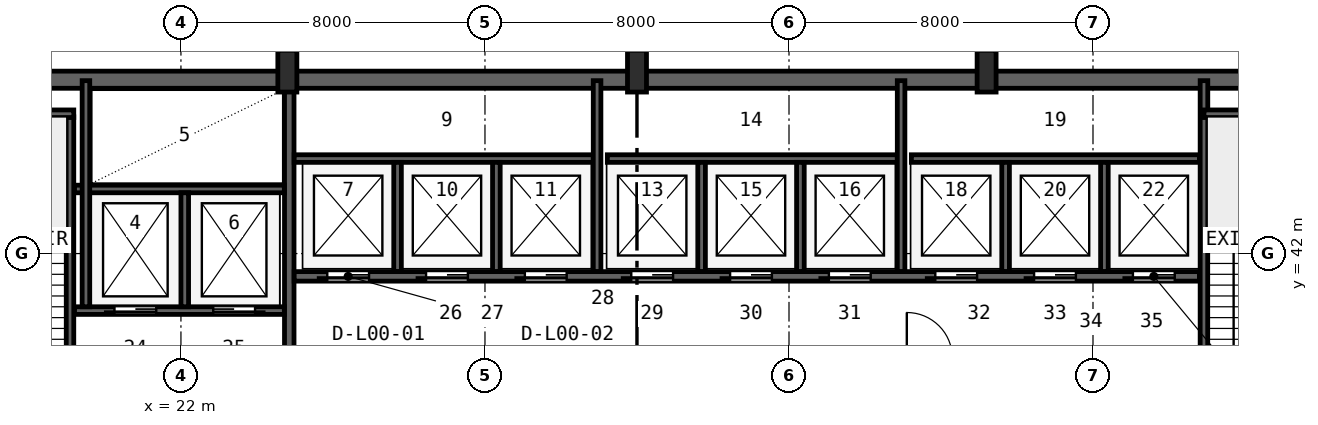
"""IFC4 building model, lengths in metres.
Left out: names, types, materials, properties, quantities, classifications, styles, units other than length and angle.
Written with IfcOpenShell. Run it as: python <this file> out.ifc"""

import sys

from ifc_helpers import new_model, si_unit, direction, frame, frame_2d, origin, origin_2d, place, context, subcontext, project, spatial, rectangle, i_section, extrude, source, transform, mapped, element, fill, save


model = new_model("IFC4")
c1 = context("Model", 3, precision=1e-05, world=origin(), true_north=direction((0.0, 1.0)))
c2 = subcontext(c1, "Body", "Model", "MODEL_VIEW")
j1 = project(units=[si_unit("LENGTHUNIT", "METRE"), si_unit("PLANEANGLEUNIT", "RADIAN")], contexts=[c1])
p1 = place(None, origin())
s1 = spatial("IfcSite", under=j1, at=p1, CompositionType="ELEMENT")
p2 = place(p1, origin())
s2 = spatial("IfcBuilding", under=s1, at=p2, CompositionType="ELEMENT")
p3 = place(p2, origin())
s3 = spatial("IfcBuildingStorey", under=s2, at=p3, CompositionType="ELEMENT", Elevation=0.0)
p4 = place(p3, frame((15.6, 46.575, 0.0), z_axis=(0.0, 0.0, 1.0), x_axis=(1.0, 0.0, 0.0)))
e1 = element("IfcWall", 1, at=p4, inside=s3, PredefinedType="SHEAR", context=c2, shape_type="SweptSolid", body=[
    extrude(rectangle(XDim=36.8, YDim=0.45, at=frame_2d((18.4, 0.0))), origin(), (0.0, 0.0, 1.0), 5.72),
])
m1 = source(origin(), c2, "Body", "SweptSolid", [
    extrude(i_section(OverallWidth=0.5, OverallDepth=1.1, WebThickness=0.018, FlangeThickness=0.032, FilletRadius=0.018, at=origin_2d()), origin(), (0.0, 0.0, 1.0), 6.0),
])
for number, where, z_axis, x_axis in (
    (2, (24.8, 46.8, 0.0), (0.0, 0.0, 1.0), (1.0, 0.0, 0.0)),
    (3, (34.0, 46.8, 0.0), (0.0, 0.0, 1.0), (1.0, 0.0, 0.0)),
    (4, (43.2, 46.8, 0.0), (0.0, 0.0, 1.0), (1.0, 0.0, 0.0)),
):
    element("IfcColumn", number, at=place(p3, frame(where, z_axis=z_axis, x_axis=x_axis)), inside=s3, PredefinedType="COLUMN", context=c2, shape_type="MappedRepresentation", body=[
        mapped(m1, transform((0.0, 0.0, 0.0), x_axis=(1.0, 0.0, 0.0), y_axis=(0.0, 1.0, 0.0), z_axis=(0.0, 0.0, 1.0), scale=1.0)),
    ])
p5 = place(p3, frame((19.08, 35.95, 0.0), z_axis=(0.0, 0.0, 1.0), x_axis=(0.0, 1.0, 0.0)))
e5 = element("IfcWall", 5, at=p5, inside=s3, PredefinedType="SHEAR", context=c2, shape_type="SweptSolid", body=[
    extrude(rectangle(XDim=9.65, YDim=0.2, at=frame_2d((4.825, 0.0))), origin(), (0.0, 0.0, 1.0), 5.72),
])
p6 = place(p5, frame((0.25, 0.0, 0.0)))
e6 = element("IfcOpeningElement", 6, at=p6, cuts=e5, PredefinedType="OPENING", context=c2, shape_type="SweptSolid", body=[
    extrude(rectangle(XDim=0.95, YDim=2.1, at=frame_2d((0.475, 1.05))), frame((0.0, 0.11, 0.0), z_axis=(0.0, -1.0, 0.0), x_axis=(1.0, 0.0, 0.0)), (0.0, 0.0, 1.0), 0.22),
])
p7 = place(p3, frame((15.95, 45.68, 0.0), z_axis=(0.0, 0.0, 1.0), x_axis=(1.0, 0.0, 0.0)))
e7 = element("IfcWall", 7, at=p7, inside=s3, PredefinedType="SHEAR", context=c2, shape_type="SweptSolid", body=[
    extrude(rectangle(XDim=3.23, YDim=0.2, at=frame_2d((1.615, 0.0))), origin(), (0.0, 0.0, 1.0), 5.72),
])
p8 = place(p3, frame((24.85, 36.05, 0.0), z_axis=(0.0, 0.0, 1.0), x_axis=(0.0, 1.0, 0.0)))
e8 = element("IfcWall", 8, at=p8, inside=s3, PredefinedType="SHEAR", context=c2, shape_type="SweptSolid", body=[
    extrude(rectangle(XDim=10.45, YDim=0.25, at=frame_2d((5.225, 0.0))), origin(), (0.0, 0.0, 1.0), 5.72),
])
p9 = place(p3, frame((19.2, 40.5, 0.0), z_axis=(0.0, 0.0, 1.0), x_axis=(1.0, 0.0, 0.0)))
e9 = element("IfcWall", 9, at=p9, inside=s3, PredefinedType="SHEAR", context=c2, shape_type="SweptSolid", body=[
    extrude(rectangle(XDim=5.52, YDim=0.2, at=frame_2d((2.76, 0.0))), origin(), (0.0, 0.0, 1.0), 5.72),
])
p10 = place(p9, frame((1.05, 0.0, 0.0)))
e10 = element("IfcOpeningElement", 10, at=p10, cuts=e9, PredefinedType="OPENING", context=c2, shape_type="SweptSolid", body=[
    extrude(rectangle(XDim=1.1, YDim=2.18, at=frame_2d((0.55, 1.09))), frame((0.0, 0.11, 0.0), z_axis=(0.0, -1.0, 0.0), x_axis=(1.0, 0.0, 0.0)), (0.0, 0.0, 1.0), 0.22),
])
p11 = place(p9, frame((3.65, 0.0, 0.0)))
e11 = element("IfcOpeningElement", 11, at=p11, cuts=e9, PredefinedType="OPENING", context=c2, shape_type="SweptSolid", body=[
    extrude(rectangle(XDim=1.1, YDim=2.18, at=frame_2d((0.55, 1.09))), frame((0.0, 0.11, 0.0), z_axis=(0.0, -1.0, 0.0), x_axis=(1.0, 0.0, 0.0)), (0.0, 0.0, 1.0), 0.22),
])
p12 = place(p3, frame((19.2, 43.7, 0.0), z_axis=(0.0, 0.0, 1.0), x_axis=(1.0, 0.0, 0.0)))
e12 = element("IfcWall", 12, at=p12, inside=s3, PredefinedType="SHEAR", context=c2, shape_type="SweptSolid", body=[
    extrude(rectangle(XDim=5.52, YDim=0.2, at=frame_2d((2.76, 0.0))), origin(), (0.0, 0.0, 1.0), 5.72),
])
p13 = place(p3, frame((22.1, 40.6, 0.0), z_axis=(0.0, 0.0, 1.0), x_axis=(0.0, 1.0, 0.0)))
e13 = element("IfcWall", 13, at=p13, inside=s3, PredefinedType="SHEAR", context=c2, shape_type="SweptSolid", body=[
    extrude(rectangle(XDim=3.0, YDim=0.2, at=frame_2d((1.5, 0.0))), origin(), (0.0, 0.0, 1.0), 5.72),
])
p14 = place(p3, frame((19.5, 40.6, 0.0), z_axis=(0.0, 0.0, 1.0), x_axis=(0.0, 1.0, 0.0)))
e14 = element("IfcWall", 14, at=p14, inside=s3, PredefinedType="SHEAR", context=c2, shape_type="SweptSolid", body=[
    extrude(rectangle(XDim=5.95, YDim=0.2, at=frame_2d((2.975, 0.0))), origin(), (0.0, 0.0, 1.0), 5.72),
])
p15 = place(p3, frame((48.92, 36.05, 0.0), z_axis=(0.0, 0.0, 1.0), x_axis=(0.0, 1.0, 0.0)))
e15 = element("IfcWall", 15, at=p15, inside=s3, PredefinedType="SHEAR", context=c2, shape_type="SweptSolid", body=[
    extrude(rectangle(XDim=10.5, YDim=0.2, at=frame_2d((5.25, 0.0))), origin(), (0.0, 0.0, 1.0), 5.72),
])
p16 = place(p3, frame((48.92, 45.68, 0.0), z_axis=(0.0, 0.0, 1.0), x_axis=(1.0, 0.0, 0.0)))
e16 = element("IfcWall", 16, at=p16, inside=s3, PredefinedType="SHEAR", context=c2, shape_type="SweptSolid", body=[
    extrude(rectangle(XDim=3.18, YDim=0.2, at=frame_2d((1.59, 0.0))), origin(), (0.0, 0.0, 1.0), 5.72),
])
p17 = place(p3, frame((24.98, 41.4, 0.0), z_axis=(0.0, 0.0, 1.0), x_axis=(1.0, 0.0, 0.0)))
e17 = element("IfcWall", 17, at=p17, inside=s3, PredefinedType="SHEAR", context=c2, shape_type="SweptSolid", body=[
    extrude(rectangle(XDim=23.82, YDim=0.25, at=frame_2d((11.91, 0.0))), origin(), (0.0, 0.0, 1.0), 5.72),
])
p18 = place(p17, frame((0.87, 0.0, 0.0)))
e18 = element("IfcOpeningElement", 18, at=p18, cuts=e17, PredefinedType="OPENING", context=c2, shape_type="SweptSolid", body=[
    extrude(rectangle(XDim=1.1, YDim=2.18, at=frame_2d((0.55, 1.09))), frame((0.0, 0.135, 0.0), z_axis=(0.0, -1.0, 0.0), x_axis=(1.0, 0.0, 0.0)), (0.0, 0.0, 1.0), 0.27),
])
p19 = place(p17, frame((3.47, 0.0, 0.0)))
e19 = element("IfcOpeningElement", 19, at=p19, cuts=e17, PredefinedType="OPENING", context=c2, shape_type="SweptSolid", body=[
    extrude(rectangle(XDim=1.1, YDim=2.18, at=frame_2d((0.55, 1.09))), frame((0.0, 0.135, 0.0), z_axis=(0.0, -1.0, 0.0), x_axis=(1.0, 0.0, 0.0)), (0.0, 0.0, 1.0), 0.27),
])
p20 = place(p17, frame((6.07, 0.0, 0.0)))
e20 = element("IfcOpeningElement", 20, at=p20, cuts=e17, PredefinedType="OPENING", context=c2, shape_type="SweptSolid", body=[
    extrude(rectangle(XDim=1.1, YDim=2.18, at=frame_2d((0.55, 1.09))), frame((0.0, 0.135, 0.0), z_axis=(0.0, -1.0, 0.0), x_axis=(1.0, 0.0, 0.0)), (0.0, 0.0, 1.0), 0.27),
])
p21 = place(p17, frame((8.87, 0.0, 0.0)))
e21 = element("IfcOpeningElement", 21, at=p21, cuts=e17, PredefinedType="OPENING", context=c2, shape_type="SweptSolid", body=[
    extrude(rectangle(XDim=1.1, YDim=2.18, at=frame_2d((0.55, 1.09))), frame((0.0, 0.135, 0.0), z_axis=(0.0, -1.0, 0.0), x_axis=(1.0, 0.0, 0.0)), (0.0, 0.0, 1.0), 0.27),
])
p22 = place(p17, frame((11.47, 0.0, 0.0)))
e22 = element("IfcOpeningElement", 22, at=p22, cuts=e17, PredefinedType="OPENING", context=c2, shape_type="SweptSolid", body=[
    extrude(rectangle(XDim=1.1, YDim=2.18, at=frame_2d((0.55, 1.09))), frame((0.0, 0.135, 0.0), z_axis=(0.0, -1.0, 0.0), x_axis=(1.0, 0.0, 0.0)), (0.0, 0.0, 1.0), 0.27),
])
p23 = place(p17, frame((14.07, 0.0, 0.0)))
e23 = element("IfcOpeningElement", 23, at=p23, cuts=e17, PredefinedType="OPENING", context=c2, shape_type="SweptSolid", body=[
    extrude(rectangle(XDim=1.1, YDim=2.18, at=frame_2d((0.55, 1.09))), frame((0.0, 0.135, 0.0), z_axis=(0.0, -1.0, 0.0), x_axis=(1.0, 0.0, 0.0)), (0.0, 0.0, 1.0), 0.27),
])
p24 = place(p17, frame((16.87, 0.0, 0.0)))
e24 = element("IfcOpeningElement", 24, at=p24, cuts=e17, PredefinedType="OPENING", context=c2, shape_type="SweptSolid", body=[
    extrude(rectangle(XDim=1.1, YDim=2.18, at=frame_2d((0.55, 1.09))), frame((0.0, 0.135, 0.0), z_axis=(0.0, -1.0, 0.0), x_axis=(1.0, 0.0, 0.0)), (0.0, 0.0, 1.0), 0.27),
])
p25 = place(p17, frame((19.47, 0.0, 0.0)))
e25 = element("IfcOpeningElement", 25, at=p25, cuts=e17, PredefinedType="OPENING", context=c2, shape_type="SweptSolid", body=[
    extrude(rectangle(XDim=1.1, YDim=2.18, at=frame_2d((0.55, 1.09))), frame((0.0, 0.135, 0.0), z_axis=(0.0, -1.0, 0.0), x_axis=(1.0, 0.0, 0.0)), (0.0, 0.0, 1.0), 0.27),
])
p26 = place(p17, frame((22.07, 0.0, 0.0)))
e26 = element("IfcOpeningElement", 26, at=p26, cuts=e17, PredefinedType="OPENING", context=c2, shape_type="SweptSolid", body=[
    extrude(rectangle(XDim=1.1, YDim=2.18, at=frame_2d((0.55, 1.09))), frame((0.0, 0.135, 0.0), z_axis=(0.0, -1.0, 0.0), x_axis=(1.0, 0.0, 0.0)), (0.0, 0.0, 1.0), 0.27),
])
p27 = place(p3, frame((24.98, 44.5, 0.0), z_axis=(0.0, 0.0, 1.0), x_axis=(1.0, 0.0, 0.0)))
e27 = element("IfcWall", 27, at=p27, inside=s3, PredefinedType="SHEAR", context=c2, shape_type="SweptSolid", body=[
    extrude(rectangle(XDim=7.87, YDim=0.2, at=frame_2d((3.935, 0.0))), origin(), (0.0, 0.0, 1.0), 5.72),
])
for number, where, z_axis, x_axis in (
    (28, (27.7, 41.53, 0.0), (0.0, 0.0, 1.0), (0.0, 1.0, 0.0)),
    (29, (30.3, 41.53, 0.0), (0.0, 0.0, 1.0), (0.0, 1.0, 0.0)),
):
    element("IfcWall", number, at=place(p3, frame(where, z_axis=z_axis, x_axis=x_axis)), inside=s3, PredefinedType="SHEAR", context=c2, shape_type="SweptSolid", body=[
        extrude(rectangle(XDim=2.87, YDim=0.2, at=frame_2d((1.435, 0.0))), origin(), (0.0, 0.0, 1.0), 5.72),
    ])
p28 = place(p3, frame((32.95, 41.53, 0.0), z_axis=(0.0, 0.0, 1.0), x_axis=(0.0, 1.0, 0.0)))
e30 = element("IfcWall", 30, at=p28, inside=s3, PredefinedType="SHEAR", context=c2, shape_type="SweptSolid", body=[
    extrude(rectangle(XDim=5.02, YDim=0.2, at=frame_2d((2.51, 0.0))), origin(), (0.0, 0.0, 1.0), 5.72),
])
p29 = place(p3, frame((33.22, 44.5, 0.0), z_axis=(0.0, 0.0, 1.0), x_axis=(1.0, 0.0, 0.0)))
e31 = element("IfcWall", 31, at=p29, inside=s3, PredefinedType="SHEAR", context=c2, shape_type="SweptSolid", body=[
    extrude(rectangle(XDim=7.63, YDim=0.2, at=frame_2d((3.815, 0.0))), origin(), (0.0, 0.0, 1.0), 5.72),
])
for number, where, z_axis, x_axis in (
    (32, (35.7, 41.53, 0.0), (0.0, 0.0, 1.0), (0.0, 1.0, 0.0)),
    (33, (38.3, 41.53, 0.0), (0.0, 0.0, 1.0), (0.0, 1.0, 0.0)),
):
    element("IfcWall", number, at=place(p3, frame(where, z_axis=z_axis, x_axis=x_axis)), inside=s3, PredefinedType="SHEAR", context=c2, shape_type="SweptSolid", body=[
        extrude(rectangle(XDim=2.87, YDim=0.2, at=frame_2d((1.435, 0.0))), origin(), (0.0, 0.0, 1.0), 5.72),
    ])
p30 = place(p3, frame((40.95, 41.53, 0.0), z_axis=(0.0, 0.0, 1.0), x_axis=(0.0, 1.0, 0.0)))
e34 = element("IfcWall", 34, at=p30, inside=s3, PredefinedType="SHEAR", context=c2, shape_type="SweptSolid", body=[
    extrude(rectangle(XDim=5.02, YDim=0.2, at=frame_2d((2.51, 0.0))), origin(), (0.0, 0.0, 1.0), 5.72),
])
p31 = place(p3, frame((41.22, 44.5, 0.0), z_axis=(0.0, 0.0, 1.0), x_axis=(1.0, 0.0, 0.0)))
e35 = element("IfcWall", 35, at=p31, inside=s3, PredefinedType="SHEAR", context=c2, shape_type="SweptSolid", body=[
    extrude(rectangle(XDim=7.58, YDim=0.2, at=frame_2d((3.79, 0.0))), origin(), (0.0, 0.0, 1.0), 5.72),
])
for number, where, z_axis, x_axis in (
    (36, (43.7, 41.53, 0.0), (0.0, 0.0, 1.0), (0.0, 1.0, 0.0)),
    (37, (46.3, 41.53, 0.0), (0.0, 0.0, 1.0), (0.0, 1.0, 0.0)),
):
    element("IfcWall", number, at=place(p3, frame(where, z_axis=z_axis, x_axis=x_axis)), inside=s3, PredefinedType="SHEAR", context=c2, shape_type="SweptSolid", body=[
        extrude(rectangle(XDim=2.87, YDim=0.2, at=frame_2d((1.435, 0.0))), origin(), (0.0, 0.0, 1.0), 5.72),
    ])
m2 = source(origin(), c2, "Body", "SweptSolid", [
    extrude(rectangle(XDim=1.1, YDim=2.18, at=frame_2d((0.55, 1.09))), frame((0.0, 0.025, 0.0), z_axis=(0.0, -1.0, 0.0), x_axis=(1.0, 0.0, 0.0)), (0.0, 0.0, 1.0), 0.05),
])
p32 = place(p10, frame((1.1, 0.0, 0.0), z_axis=(0.0, 0.0, 1.0), x_axis=(-1.0, 0.0, 0.0)))
e38 = element("IfcDoor", 38, at=p32, inside=s3, OperationType="SLIDING_TO_LEFT", PredefinedType="DOOR", context=c2, shape_type="MappedRepresentation", body=[
    mapped(m2, transform((0.0, 0.0, 0.0), x_axis=(1.0, 0.0, 0.0), y_axis=(0.0, 1.0, 0.0), z_axis=(0.0, 0.0, 1.0), scale=1.0)),
])
fill(e10, e38)
p33 = place(p11, frame((1.1, 0.0, 0.0), z_axis=(0.0, 0.0, 1.0), x_axis=(-1.0, 0.0, 0.0)))
e39 = element("IfcDoor", 39, at=p33, inside=s3, OperationType="SLIDING_TO_RIGHT", PredefinedType="DOOR", context=c2, shape_type="MappedRepresentation", body=[
    mapped(m2, transform((0.0, 0.0, 0.0), x_axis=(1.0, 0.0, 0.0), y_axis=(0.0, 1.0, 0.0), z_axis=(0.0, 0.0, 1.0), scale=1.0)),
])
fill(e11, e39)
p34 = place(p18, frame((1.1, 0.0, 0.0), z_axis=(0.0, 0.0, 1.0), x_axis=(-1.0, 0.0, 0.0)))
e40 = element("IfcDoor", 40, at=p34, inside=s3, OperationType="SLIDING_TO_LEFT", PredefinedType="DOOR", context=c2, shape_type="MappedRepresentation", body=[
    mapped(m2, transform((0.0, 0.0, 0.0), x_axis=(1.0, 0.0, 0.0), y_axis=(0.0, 1.0, 0.0), z_axis=(0.0, 0.0, 1.0), scale=1.0)),
])
fill(e18, e40)
p35 = place(p19, frame((1.1, 0.0, 0.0), z_axis=(0.0, 0.0, 1.0), x_axis=(-1.0, 0.0, 0.0)))
e41 = element("IfcDoor", 41, at=p35, inside=s3, OperationType="SLIDING_TO_LEFT", PredefinedType="DOOR", context=c2, shape_type="MappedRepresentation", body=[
    mapped(m2, transform((0.0, 0.0, 0.0), x_axis=(1.0, 0.0, 0.0), y_axis=(0.0, 1.0, 0.0), z_axis=(0.0, 0.0, 1.0), scale=1.0)),
])
fill(e19, e41)
p36 = place(p20, frame((1.1, 0.0, 0.0), z_axis=(0.0, 0.0, 1.0), x_axis=(-1.0, 0.0, 0.0)))
e42 = element("IfcDoor", 42, at=p36, inside=s3, OperationType="SLIDING_TO_LEFT", PredefinedType="DOOR", context=c2, shape_type="MappedRepresentation", body=[
    mapped(m2, transform((0.0, 0.0, 0.0), x_axis=(1.0, 0.0, 0.0), y_axis=(0.0, 1.0, 0.0), z_axis=(0.0, 0.0, 1.0), scale=1.0)),
])
fill(e20, e42)
p37 = place(p21, frame((1.1, 0.0, 0.0), z_axis=(0.0, 0.0, 1.0), x_axis=(-1.0, 0.0, 0.0)))
e43 = element("IfcDoor", 43, at=p37, inside=s3, OperationType="SLIDING_TO_LEFT", PredefinedType="DOOR", context=c2, shape_type="MappedRepresentation", body=[
    mapped(m2, transform((0.0, 0.0, 0.0), x_axis=(1.0, 0.0, 0.0), y_axis=(0.0, 1.0, 0.0), z_axis=(0.0, 0.0, 1.0), scale=1.0)),
])
fill(e21, e43)
p38 = place(p22, frame((1.1, 0.0, 0.0), z_axis=(0.0, 0.0, 1.0), x_axis=(-1.0, 0.0, 0.0)))
e44 = element("IfcDoor", 44, at=p38, inside=s3, OperationType="SLIDING_TO_LEFT", PredefinedType="DOOR", context=c2, shape_type="MappedRepresentation", body=[
    mapped(m2, transform((0.0, 0.0, 0.0), x_axis=(1.0, 0.0, 0.0), y_axis=(0.0, 1.0, 0.0), z_axis=(0.0, 0.0, 1.0), scale=1.0)),
])
fill(e22, e44)
p39 = place(p23, frame((1.1, 0.0, 0.0), z_axis=(0.0, 0.0, 1.0), x_axis=(-1.0, 0.0, 0.0)))
e45 = element("IfcDoor", 45, at=p39, inside=s3, OperationType="SLIDING_TO_LEFT", PredefinedType="DOOR", context=c2, shape_type="MappedRepresentation", body=[
    mapped(m2, transform((0.0, 0.0, 0.0), x_axis=(1.0, 0.0, 0.0), y_axis=(0.0, 1.0, 0.0), z_axis=(0.0, 0.0, 1.0), scale=1.0)),
])
fill(e23, e45)
p40 = place(p24, frame((1.1, 0.0, 0.0), z_axis=(0.0, 0.0, 1.0), x_axis=(-1.0, 0.0, 0.0)))
e46 = element("IfcDoor", 46, at=p40, inside=s3, OperationType="SLIDING_TO_LEFT", PredefinedType="DOOR", context=c2, shape_type="MappedRepresentation", body=[
    mapped(m2, transform((0.0, 0.0, 0.0), x_axis=(1.0, 0.0, 0.0), y_axis=(0.0, 1.0, 0.0), z_axis=(0.0, 0.0, 1.0), scale=1.0)),
])
fill(e24, e46)
p41 = place(p25, frame((1.1, 0.0, 0.0), z_axis=(0.0, 0.0, 1.0), x_axis=(-1.0, 0.0, 0.0)))
e47 = element("IfcDoor", 47, at=p41, inside=s3, OperationType="SLIDING_TO_LEFT", PredefinedType="DOOR", context=c2, shape_type="MappedRepresentation", body=[
    mapped(m2, transform((0.0, 0.0, 0.0), x_axis=(1.0, 0.0, 0.0), y_axis=(0.0, 1.0, 0.0), z_axis=(0.0, 0.0, 1.0), scale=1.0)),
])
fill(e25, e47)
p42 = place(p26, frame((1.1, 0.0, 0.0), z_axis=(0.0, 0.0, 1.0), x_axis=(-1.0, 0.0, 0.0)))
e48 = element("IfcDoor", 48, at=p42, inside=s3, OperationType="SLIDING_TO_LEFT", PredefinedType="DOOR", context=c2, shape_type="MappedRepresentation", body=[
    mapped(m2, transform((0.0, 0.0, 0.0), x_axis=(1.0, 0.0, 0.0), y_axis=(0.0, 1.0, 0.0), z_axis=(0.0, 0.0, 1.0), scale=1.0)),
])
fill(e26, e48)
save(model, sys.argv[1])
